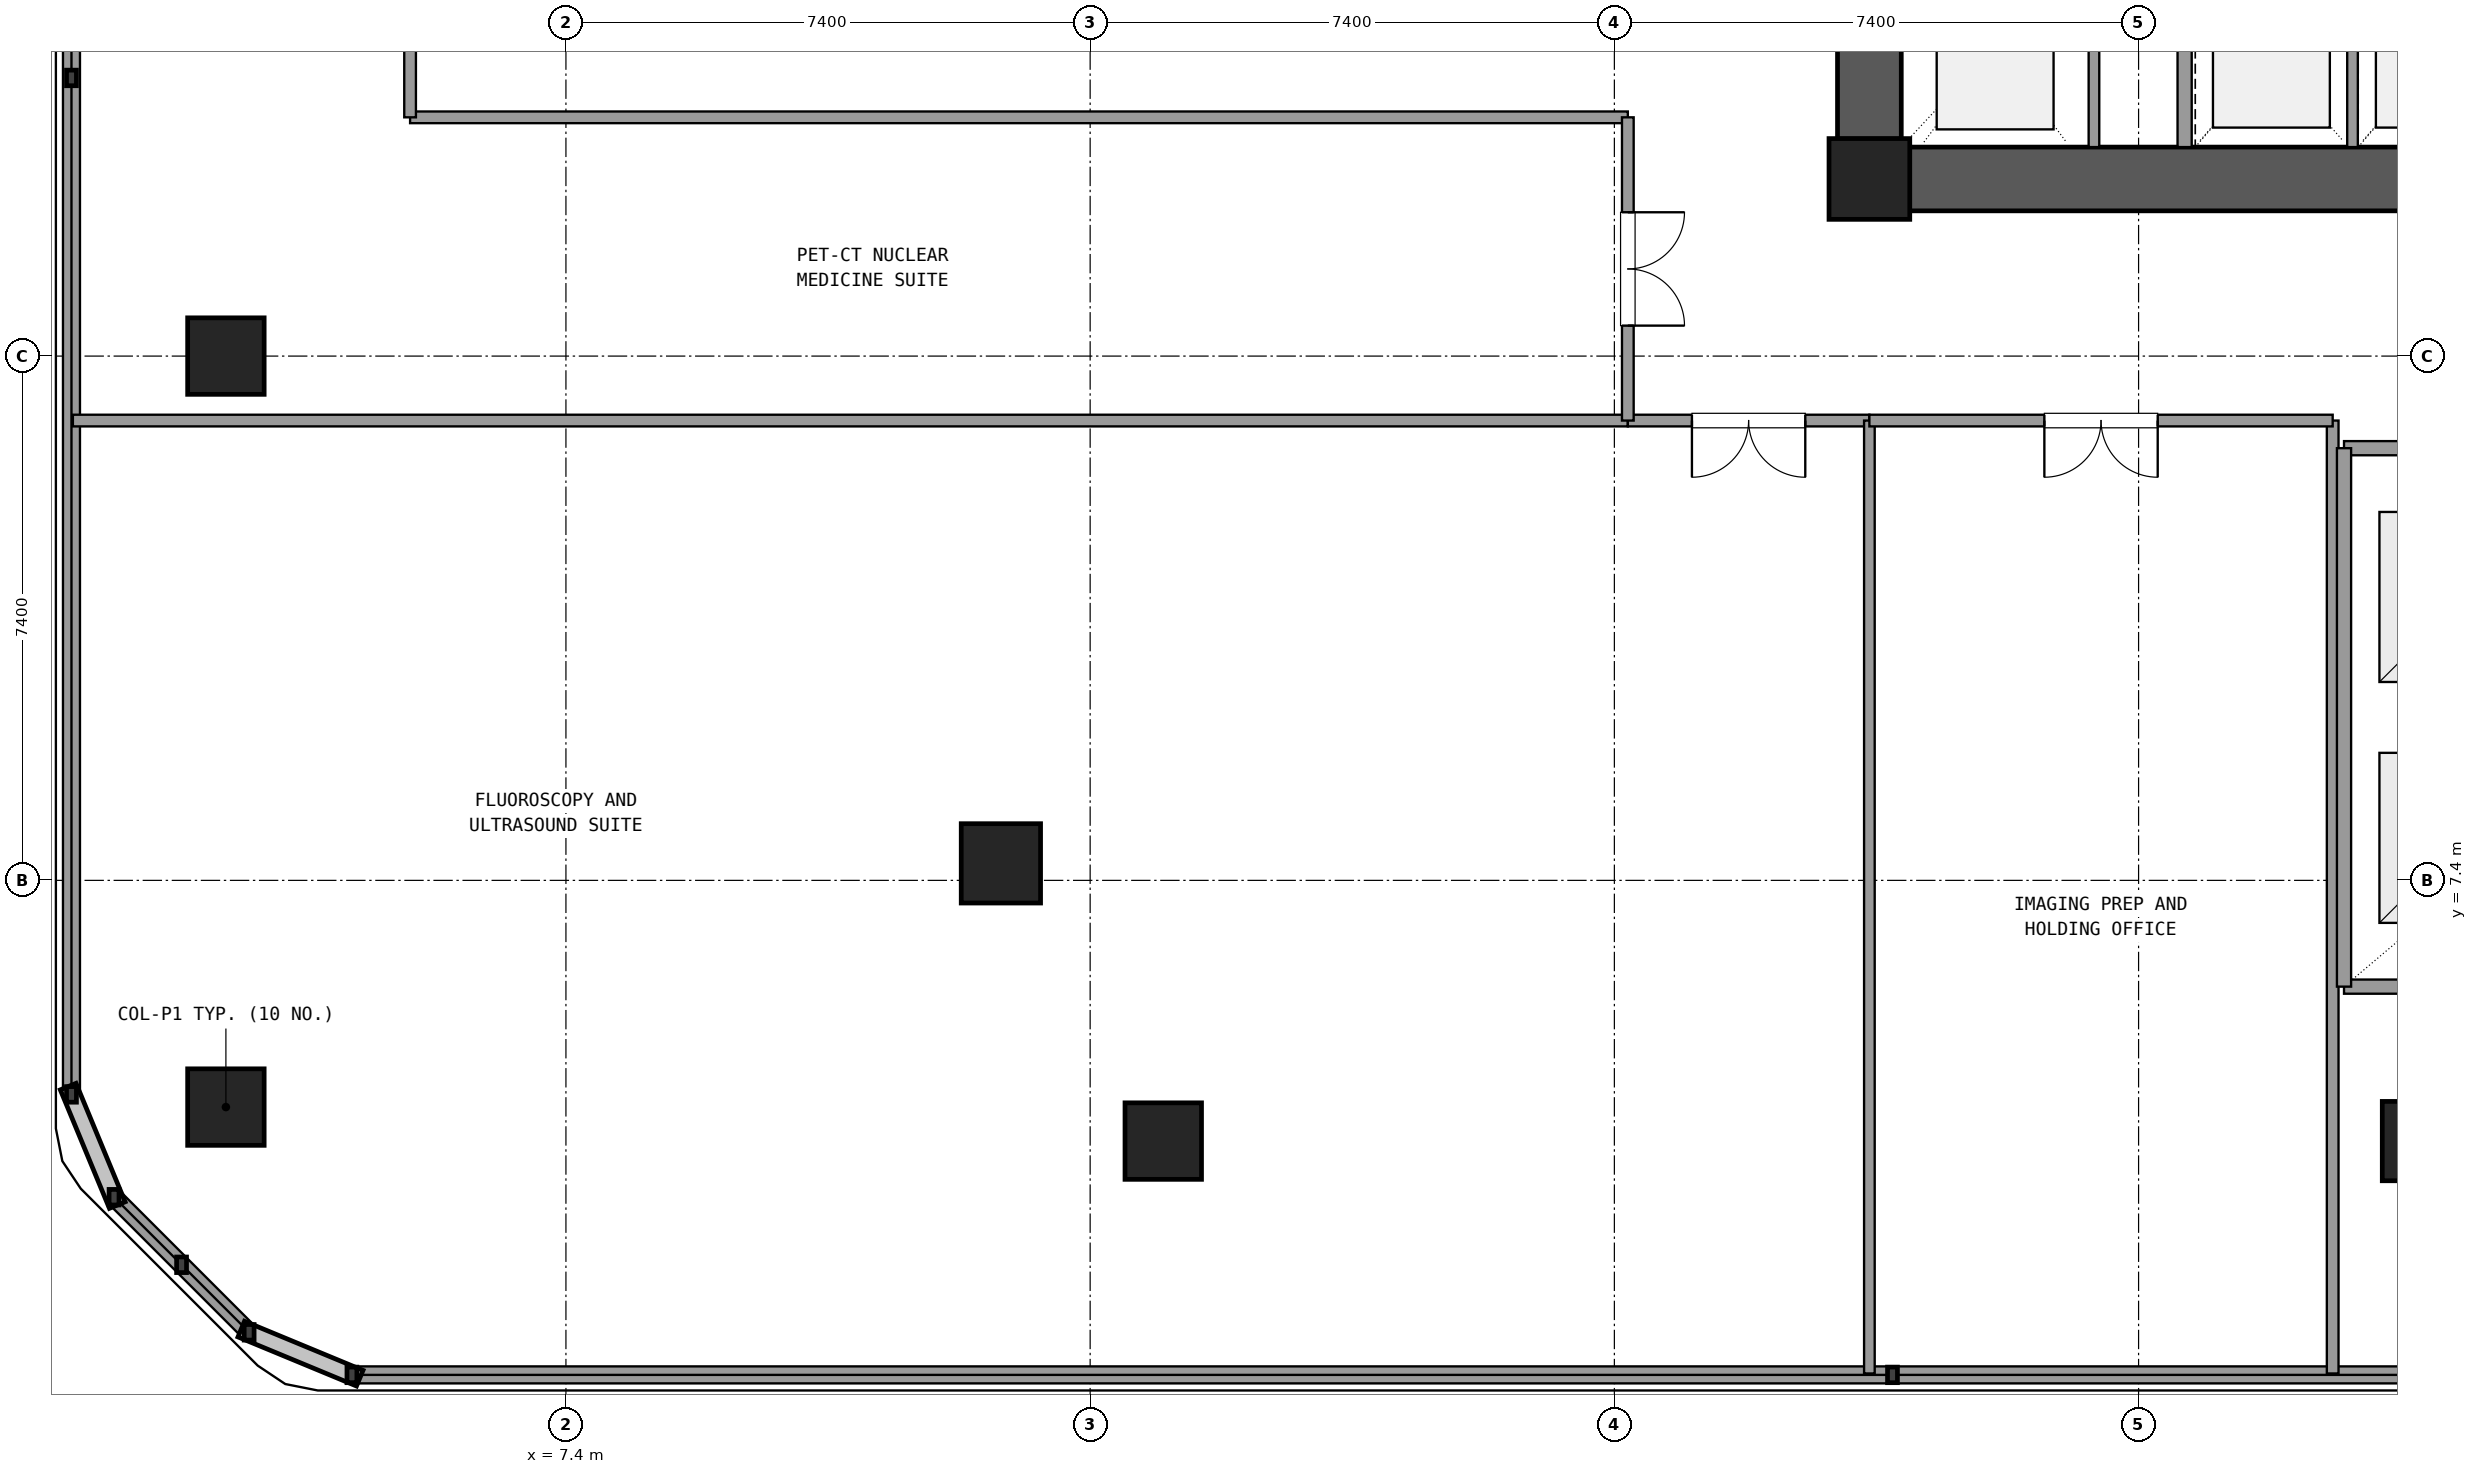
"""IFC4 building model, lengths in metres.
Left out: names, types, materials, properties, quantities, classifications, styles, units other than length and angle.
Written with IfcOpenShell. Run it as: python <this file> out.ifc"""

import sys

from ifc_helpers import new_model, si_unit, direction, frame, frame_2d, origin, origin_2d, place, context, subcontext, project, spatial, rectangle, circle, extrude, element, fill, save


model = new_model("IFC4")
c1 = context("Model", 3, precision=1e-05, world=origin(), true_north=direction((0.0, 1.0)))
c2 = subcontext(c1, "Body", "Model", "MODEL_VIEW")
j1 = project(units=[si_unit("LENGTHUNIT", "METRE"), si_unit("PLANEANGLEUNIT", "RADIAN")], contexts=[c1])
p1 = place(None, origin())
s1 = spatial("IfcSite", under=j1, at=p1, CompositionType="ELEMENT")
p2 = place(p1, origin())
s2 = spatial("IfcBuilding", under=s1, at=p2, CompositionType="ELEMENT")
p3 = place(p2, frame((0.0, 0.0, 9.9)))
s3 = spatial("IfcBuildingStorey", under=s2, at=p3, CompositionType="ELEMENT", Elevation=9.9)
p4 = place(p3, frame((25.8, 17.3, 0.0), z_axis=(0.0, 0.0, 1.0), x_axis=(1.0, 0.0, 0.0)))
e1 = element("IfcColumn", 1, at=p4, inside=s3, PredefinedType="COLUMN", context=c2, shape_type="SweptSolid", body=[
    extrude(rectangle(XDim=1.14, YDim=1.14, at=origin_2d()), origin(), (0.0, 0.0, 1.0), 4.5),
])
p5 = place(p3, frame((26.365, 17.3, 0.0), z_axis=(0.0, 0.0, 1.0), x_axis=(1.0, 0.0, 0.0)))
e2 = element("IfcWall", 2, at=p5, inside=s3, PredefinedType="SHEAR", context=c2, shape_type="SweptSolid", body=[
    extrude(rectangle(XDim=10.07, YDim=0.9, at=frame_2d((5.035, 0.0))), origin(), (0.0, 0.0, 1.0), 4.2),
])
p6 = place(p3, frame((25.8, 25.335, 0.0), z_axis=(0.0, 0.0, 1.0), x_axis=(0.0, -1.0, 0.0)))
e3 = element("IfcWall", 3, at=p6, inside=s3, PredefinedType="SHEAR", context=c2, shape_type="SweptSolid", body=[
    extrude(rectangle(XDim=7.47, YDim=0.9, at=frame_2d((3.735, 0.0))), origin(), (0.0, 0.0, 1.0), 4.2),
])
p7 = place(p6, frame((2.085, 0.0, 0.0)))
e4 = element("IfcOpeningElement", 4, at=p7, cuts=e3, PredefinedType="OPENING", context=c2, shape_type="SweptSolid", body=[
    extrude(rectangle(XDim=1.2, YDim=2.15, at=frame_2d((0.6, 1.075))), frame((0.0, 0.46, 0.0), z_axis=(0.0, -1.0, 0.0), x_axis=(1.0, 0.0, 0.0)), (0.0, 0.0, 1.0), 0.92),
])
p8 = place(p3, frame((13.54, 7.64, 0.0), z_axis=(0.0, 0.0, 1.0), x_axis=(1.0, 0.0, 0.0)))
e5 = element("IfcColumn", 5, at=p8, inside=s3, PredefinedType="COLUMN", context=c2, shape_type="SweptSolid", body=[
    extrude(circle(Radius=0.56, at=origin_2d()), origin(), (0.0, 0.0, 1.0), 4.5),
])
p9 = place(p3, frame((15.832, 3.72, 0.0), z_axis=(0.0, 0.0, 1.0), x_axis=(1.0, 0.0, 0.0)))
e6 = element("IfcColumn", 6, at=p9, inside=s3, PredefinedType="COLUMN", context=c2, shape_type="SweptSolid", body=[
    extrude(rectangle(XDim=1.08, YDim=1.08, at=origin_2d()), origin(), (0.0, 0.0, 1.0), 4.5),
])
p10 = place(p3, frame((33.6, 3.72, 0.0), z_axis=(0.0, 0.0, 1.0), x_axis=(1.0, 0.0, 0.0)))
e7 = element("IfcColumn", 7, at=p10, inside=s3, PredefinedType="COLUMN", context=c2, shape_type="SweptSolid", body=[
    extrude(circle(Radius=0.56, at=origin_2d()), origin(), (0.0, 0.0, 1.0), 4.5),
])
for number, where, z_axis, x_axis in (
    (8, (2.6, 4.2, 0.0), (0.0, 0.0, 1.0), (1.0, 0.0, 0.0)),
    (9, (2.6, 14.8, 0.0), (0.0, 0.0, 1.0), (1.0, 0.0, 0.0)),
):
    element("IfcColumn", number, at=place(p3, frame(where, z_axis=z_axis, x_axis=x_axis)), inside=s3, PredefinedType="COLUMN", context=c2, shape_type="SweptSolid", body=[
        extrude(rectangle(XDim=1.08, YDim=1.08, at=origin_2d()), origin(), (0.0, 0.0, 1.0), 4.5),
    ])
p11 = place(p3, frame((4.379, 0.42, 0.0), z_axis=(0.0, 0.0, 1.0), x_axis=(1.0, 0.0, 0.0)))
e10 = element("IfcWall", 10, at=p11, inside=s3, PredefinedType="SOLIDWALL", context=c2, shape_type="SweptSolid", body=[
    extrude(rectangle(XDim=65.242, YDim=0.24, at=frame_2d((32.621, 0.0))), origin(), (0.0, 0.0, 1.0), 0.85),
])
p12 = place(p3, frame((0.42, 47.421, 0.0), z_axis=(0.0, 0.0, 1.0), x_axis=(0.0, -1.0, 0.0)))
e11 = element("IfcWall", 11, at=p12, inside=s3, PredefinedType="SOLIDWALL", context=c2, shape_type="SweptSolid", body=[
    extrude(rectangle(XDim=43.042, YDim=0.24, at=frame_2d((21.521, 0.0))), origin(), (0.0, 0.0, 1.0), 0.85),
])
p13 = place(p3, frame((1.021, 2.928, 0.0), z_axis=(0.0, 0.0, 1.0), x_axis=(0.707106781187, -0.707106781187, 0.0)))
e12 = element("IfcWall", 12, at=p13, inside=s3, PredefinedType="SOLIDWALL", context=c2, shape_type="SweptSolid", body=[
    extrude(rectangle(XDim=2.697, YDim=0.24, at=frame_2d((1.348, 0.0))), origin(), (0.0, 0.0, 1.0), 0.85),
])
p14 = place(p3, frame((30.25, 17.75, 0.0), z_axis=(0.0, 0.0, 1.0), x_axis=(0.0, 1.0, 0.0)))
e13 = element("IfcWall", 13, at=p14, inside=s3, PredefinedType="SOLIDWALL", context=c2, shape_type="SweptSolid", body=[
    extrude(rectangle(XDim=6.9, YDim=0.2, at=frame_2d((3.45, 0.0))), origin(), (0.0, 0.0, 1.0), 3.21),
])
p15 = place(p14, frame((4.15, 0.0, 0.0)))
e14 = element("IfcOpeningElement", 14, at=p15, cuts=e13, PredefinedType="OPENING", context=c2, shape_type="SweptSolid", body=[
    extrude(rectangle(XDim=1.2, YDim=2.15, at=frame_2d((0.6, 1.075))), frame((0.0, 0.11, 0.0), z_axis=(0.0, -1.0, 0.0), x_axis=(1.0, 0.0, 0.0)), (0.0, 0.0, 1.0), 0.22),
])
p16 = place(p3, frame((28.97, 17.75, 0.0), z_axis=(0.0, 0.0, 1.0), x_axis=(0.0, 1.0, 0.0)))
e15 = element("IfcWall", 15, at=p16, inside=s3, PredefinedType="PARTITIONING", context=c2, shape_type="SweptSolid", body=[
    extrude(rectangle(XDim=2.95, YDim=0.15, at=frame_2d((1.475, 0.0))), origin(), (0.0, 0.0, 1.0), 3.21),
])
p17 = place(p3, frame((32.62, 17.75, 0.0), z_axis=(0.0, 0.0, 1.0), x_axis=(0.0, 1.0, 0.0)))
e16 = element("IfcWall", 16, at=p17, inside=s3, PredefinedType="PARTITIONING", context=c2, shape_type="SweptSolid", body=[
    extrude(rectangle(XDim=2.61, YDim=0.15, at=frame_2d((1.305, 0.0))), origin(), (0.0, 0.0, 1.0), 3.21),
])
p18 = place(p3, frame((0.44, 13.89, 0.0), z_axis=(0.0, 0.0, 1.0), x_axis=(1.0, 0.0, 0.0)))
e17 = element("IfcWall", 17, at=p18, inside=s3, PredefinedType="PARTITIONING", context=c2, shape_type="SweptSolid", body=[
    extrude(rectangle(XDim=21.95, YDim=0.165, at=frame_2d((10.975, 0.0))), origin(), (0.0, 0.0, 1.0), 3.21),
])
p19 = place(p3, frame((5.2, 18.17, 0.0), z_axis=(0.0, 0.0, 1.0), x_axis=(1.0, 0.0, 0.0)))
e18 = element("IfcWall", 18, at=p19, inside=s3, PredefinedType="PARTITIONING", context=c2, shape_type="SweptSolid", body=[
    extrude(rectangle(XDim=17.19, YDim=0.165, at=frame_2d((8.595, 0.0))), origin(), (0.0, 0.0, 1.0), 3.21),
])
p20 = place(p3, frame((5.2, 18.17, 0.0), z_axis=(0.0, 0.0, 1.0), x_axis=(0.0, 1.0, 0.0)))
e19 = element("IfcWall", 19, at=p20, inside=s3, PredefinedType="PARTITIONING", context=c2, shape_type="SweptSolid", body=[
    extrude(rectangle(XDim=2.93, YDim=0.165, at=frame_2d((1.465, 0.0))), origin(), (0.0, 0.0, 1.0), 3.21),
])
p21 = place(p3, frame((32.34, 0.44, 0.0), z_axis=(0.0, 0.0, 1.0), x_axis=(0.0, 1.0, 0.0)))
e20 = element("IfcWall", 20, at=p21, inside=s3, PredefinedType="PARTITIONING", context=c2, shape_type="SweptSolid", body=[
    extrude(rectangle(XDim=13.45, YDim=0.165, at=frame_2d((6.725, 0.0))), origin(), (0.0, 0.0, 1.0), 3.21),
])
for number, where, z_axis, x_axis in (
    (21, (32.5, 5.9, 0.0), (0.0, 0.0, 1.0), (1.0, 0.0, 0.0)),
    (22, (32.5, 13.5, 0.0), (0.0, 0.0, 1.0), (1.0, 0.0, 0.0)),
):
    element("IfcWall", number, at=place(p3, frame(where, z_axis=z_axis, x_axis=x_axis)), inside=s3, PredefinedType="SOLIDWALL", context=c2, shape_type="SweptSolid", body=[
        extrude(rectangle(XDim=9.0, YDim=0.2, at=frame_2d((4.5, 0.0))), origin(), (0.0, 0.0, 1.0), 3.21),
    ])
p22 = place(p3, frame((32.5, 5.9, 0.0), z_axis=(0.0, 0.0, 1.0), x_axis=(0.0, 1.0, 0.0)))
e23 = element("IfcWall", 23, at=p22, inside=s3, PredefinedType="SOLIDWALL", context=c2, shape_type="SweptSolid", body=[
    extrude(rectangle(XDim=7.6, YDim=0.2, at=frame_2d((3.8, 0.0))), origin(), (0.0, 0.0, 1.0), 3.21),
])
p23 = place(p3, frame((22.39, 13.89, 0.0), z_axis=(0.0, 0.0, 1.0), x_axis=(1.0, 0.0, 0.0)))
e24 = element("IfcWall", 24, at=p23, inside=s3, PredefinedType="PARTITIONING", context=c2, shape_type="SweptSolid", body=[
    extrude(rectangle(XDim=3.41, YDim=0.165, at=frame_2d((1.705, 0.0))), origin(), (0.0, 0.0, 1.0), 3.21),
])
p24 = place(p23, frame((0.905, 0.0, 0.0)))
e25 = element("IfcOpeningElement", 25, at=p24, cuts=e24, PredefinedType="OPENING", context=c2, shape_type="SweptSolid", body=[
    extrude(rectangle(XDim=1.6, YDim=2.2, at=frame_2d((0.8, 1.1))), frame((0.0, 0.093, 0.0), z_axis=(0.0, -1.0, 0.0), x_axis=(1.0, 0.0, 0.0)), (0.0, 0.0, 1.0), 0.185),
])
p25 = place(p3, frame((25.8, 0.44, 0.0), z_axis=(0.0, 0.0, 1.0), x_axis=(0.0, 1.0, 0.0)))
e26 = element("IfcWall", 26, at=p25, inside=s3, PredefinedType="PARTITIONING", context=c2, shape_type="SweptSolid", body=[
    extrude(rectangle(XDim=13.45, YDim=0.15, at=frame_2d((6.725, 0.0))), origin(), (0.0, 0.0, 1.0), 3.21),
])
p26 = place(p3, frame((25.8, 13.89, 0.0), z_axis=(0.0, 0.0, 1.0), x_axis=(1.0, 0.0, 0.0)))
e27 = element("IfcWall", 27, at=p26, inside=s3, PredefinedType="PARTITIONING", context=c2, shape_type="SweptSolid", body=[
    extrude(rectangle(XDim=6.54, YDim=0.165, at=frame_2d((3.27, 0.0))), origin(), (0.0, 0.0, 1.0), 3.21),
])
p27 = place(p26, frame((2.47, 0.0, 0.0)))
e28 = element("IfcOpeningElement", 28, at=p27, cuts=e27, PredefinedType="OPENING", context=c2, shape_type="SweptSolid", body=[
    extrude(rectangle(XDim=1.6, YDim=2.2, at=frame_2d((0.8, 1.1))), frame((0.0, 0.093, 0.0), z_axis=(0.0, -1.0, 0.0), x_axis=(1.0, 0.0, 0.0)), (0.0, 0.0, 1.0), 0.185),
])
p28 = place(p3, frame((22.39, 13.89, 0.0), z_axis=(0.0, 0.0, 1.0), x_axis=(0.0, 1.0, 0.0)))
e29 = element("IfcWall", 29, at=p28, inside=s3, PredefinedType="PARTITIONING", context=c2, shape_type="SweptSolid", body=[
    extrude(rectangle(XDim=4.28, YDim=0.165, at=frame_2d((2.14, 0.0))), origin(), (0.0, 0.0, 1.0), 3.21),
])
p29 = place(p28, frame((1.34, 0.0, 0.0)))
e30 = element("IfcOpeningElement", 30, at=p29, cuts=e29, PredefinedType="OPENING", context=c2, shape_type="SweptSolid", body=[
    extrude(rectangle(XDim=1.6, YDim=2.2, at=frame_2d((0.8, 1.1))), frame((0.0, 0.093, 0.0), z_axis=(0.0, -1.0, 0.0), x_axis=(1.0, 0.0, 0.0)), (0.0, 0.0, 1.0), 0.185),
])
p30 = place(p3, frame((0.0, 0.0, -0.3)))
p31 = place(p30, frame((34.2, 8.0, -0.01)))
p32 = place(p31, frame((0.0, 0.0, 0.29)))
e31 = element("IfcWindow", 31, at=p32, inside=s3, PartitioningType="SINGLE_PANEL", PredefinedType="SKYLIGHT", context=c2, shape_type="SweptSolid", body=[
    extrude(rectangle(XDim=2.4, YDim=2.4, at=origin_2d()), origin(), (0.0, 0.0, 1.0), 0.02),
])
p33 = place(p30, frame((34.2, 11.4, -0.01)))
p34 = place(p33, frame((0.0, 0.0, 0.29)))
e32 = element("IfcWindow", 32, at=p34, inside=s3, PartitioningType="SINGLE_PANEL", PredefinedType="SKYLIGHT", context=c2, shape_type="SweptSolid", body=[
    extrude(rectangle(XDim=2.4, YDim=2.4, at=origin_2d()), origin(), (0.0, 0.0, 1.0), 0.02),
])
p35 = place(p24, frame((1.6, 0.0, 0.0), z_axis=(0.0, 0.0, 1.0), x_axis=(-1.0, 0.0, 0.0)))
e33 = element("IfcDoor", 33, at=p35, inside=s3, OperationType="DOUBLE_DOOR_SINGLE_SWING", PredefinedType="DOOR", context=c2, shape_type="SweptSolid", body=[
    extrude(rectangle(XDim=1.6, YDim=2.2, at=frame_2d((0.8, 1.1))), frame((0.0, 0.025, 0.0), z_axis=(0.0, -1.0, 0.0), x_axis=(1.0, 0.0, 0.0)), (0.0, 0.0, 1.0), 0.05),
])
fill(e25, e33)
p36 = place(p27, frame((1.6, 0.0, 0.0), z_axis=(0.0, 0.0, 1.0), x_axis=(-1.0, 0.0, 0.0)))
e34 = element("IfcDoor", 34, at=p36, inside=s3, OperationType="DOUBLE_DOOR_SINGLE_SWING", PredefinedType="DOOR", context=c2, shape_type="SweptSolid", body=[
    extrude(rectangle(XDim=1.6, YDim=2.2, at=frame_2d((0.8, 1.1))), frame((0.0, 0.025, 0.0), z_axis=(0.0, -1.0, 0.0), x_axis=(1.0, 0.0, 0.0)), (0.0, 0.0, 1.0), 0.05),
])
fill(e28, e34)
p37 = place(p29, frame((1.6, 0.0, 0.0), z_axis=(0.0, 0.0, 1.0), x_axis=(-1.0, 0.0, 0.0)))
e35 = element("IfcDoor", 35, at=p37, inside=s3, OperationType="DOUBLE_DOOR_SINGLE_SWING", PredefinedType="DOOR", context=c2, shape_type="SweptSolid", body=[
    extrude(rectangle(XDim=1.6, YDim=2.2, at=frame_2d((0.8, 1.1))), frame((0.0, 0.025, 0.0), z_axis=(0.0, -1.0, 0.0), x_axis=(1.0, 0.0, 0.0)), (0.0, 0.0, 1.0), 0.05),
])
fill(e30, e35)
save(model, sys.argv[1])
